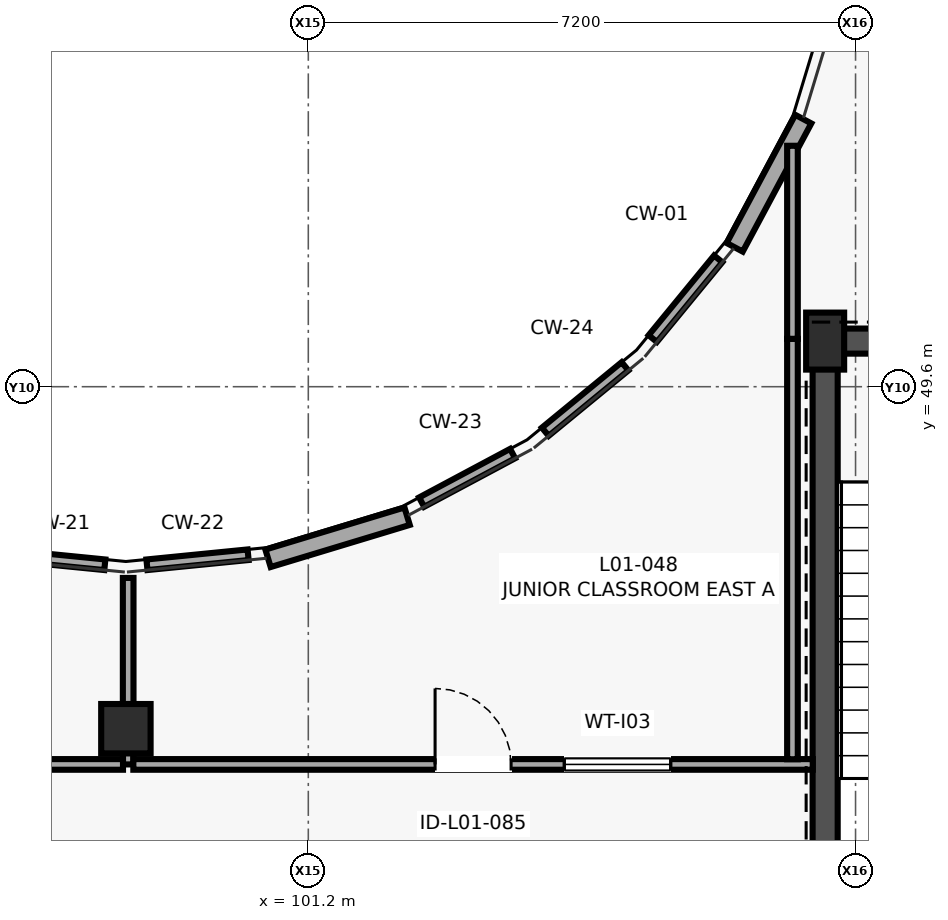
"""IFC4 building model, lengths in metres.
Left out: names, types, materials, properties, quantities, classifications, styles, units other than length and angle.
Written with IfcOpenShell. Run it as: python <this file> out.ifc"""

import sys

from ifc_helpers import new_model, si_unit, direction, frame, frame_2d, origin, origin_2d, place, context, subcontext, project, spatial, rectangle, circle, extrude, element, fill, save


model = new_model("IFC4")
c1 = context("Model", 3, precision=1e-05, world=origin(), true_north=direction((0.0, 1.0)))
c2 = subcontext(c1, "Body", "Model", "MODEL_VIEW")
j1 = project(units=[si_unit("LENGTHUNIT", "METRE"), si_unit("PLANEANGLEUNIT", "RADIAN")], contexts=[c1])
p1 = place(None, origin())
s1 = spatial("IfcSite", under=j1, at=p1, CompositionType="ELEMENT")
p2 = place(p1, origin())
s2 = spatial("IfcBuilding", under=s1, at=p2, CompositionType="ELEMENT")
p3 = place(p2, frame((0.0, 0.0, 4.2)))
s3 = spatial("IfcBuildingStorey", under=s2, at=p3, CompositionType="ELEMENT", Elevation=4.2)
p4 = place(p3, frame((98.8, 45.1, 0.0), z_axis=(0.0, 0.0, 1.0), x_axis=(1.0, 0.0, 0.0)))
e1 = element("IfcColumn", 1, at=p4, inside=s3, PredefinedType="COLUMN", context=c2, shape_type="SweptSolid", body=[
    extrude(circle(Radius=0.325, at=origin_2d()), origin(), (0.0, 0.0, 1.0), 4.0),
])
p5 = place(p3, frame((108.0, 50.2, 0.0), z_axis=(0.0, 0.0, 1.0), x_axis=(1.0, 0.0, 0.0)))
e2 = element("IfcColumn", 2, at=p5, inside=s3, PredefinedType="COLUMN", context=c2, shape_type="SweptSolid", body=[
    extrude(rectangle(XDim=0.5, YDim=0.75, at=origin_2d()), origin(), (0.0, 0.0, 1.0), 4.0),
])
p6 = place(p3, frame((100.67, 47.342, 0.0), z_axis=(0.0, 0.0, 1.0), x_axis=(0.957113490504, 0.289713248393, 0.0)))
e3 = element("IfcWall", 3, at=p6, inside=s3, PredefinedType="SOLIDWALL", context=c2, shape_type="SweptSolid", body=[
    extrude(rectangle(XDim=1.912, YDim=0.24, at=frame_2d((0.956, 0.0))), origin(), (0.0, 0.0, 1.0), 3.78),
])
p7 = place(p3, frame((106.81, 51.434, 0.0), z_axis=(0.0, 0.0, 1.0), x_axis=(0.471449153109, 0.881893245259, 0.0)))
e4 = element("IfcWall", 4, at=p7, inside=s3, PredefinedType="SOLIDWALL", context=c2, shape_type="SweptSolid", body=[
    extrude(rectangle(XDim=1.913, YDim=0.24, at=frame_2d((0.957, 0.0))), origin(), (0.0, 0.0, 1.0), 3.78),
])
p8 = place(p3, frame((107.835, 50.2, 0.0), z_axis=(0.0, 0.0, 1.0), x_axis=(1.0, 0.0, 0.0)))
e5 = element("IfcWall", 5, at=p8, inside=s3, PredefinedType="SHEAR", context=c2, shape_type="SweptSolid", body=[
    extrude(rectangle(XDim=7.53, YDim=0.33, at=frame_2d((3.765, 0.0))), origin(), (0.0, 0.0, 1.0), 3.78),
])
p9 = place(p8, frame((5.015, 0.0, 0.0)))
e6 = element("IfcOpeningElement", 6, at=p9, cuts=e5, PredefinedType="OPENING", context=c2, shape_type="SweptSolid", body=[
    extrude(rectangle(XDim=1.05, YDim=2.15, at=frame_2d((0.525, 1.075))), frame((0.0, 0.175, 0.0), z_axis=(0.0, -1.0, 0.0), x_axis=(1.0, 0.0, 0.0)), (0.0, 0.0, 1.0), 0.35),
])
p10 = place(p8, frame((1.565, 0.0, 0.0)))
e7 = element("IfcOpeningElement", 7, at=p10, cuts=e5, PredefinedType="OPENING", context=c2, shape_type="SweptSolid", body=[
    extrude(rectangle(XDim=1.1, YDim=2.15, at=frame_2d((0.55, 1.075))), frame((0.0, 0.175, 0.0), z_axis=(0.0, -1.0, 0.0), x_axis=(1.0, 0.0, 0.0)), (0.0, 0.0, 1.0), 0.35),
])
p11 = place(p3, frame((108.0, 42.565, 0.0), z_axis=(0.0, 0.0, 1.0), x_axis=(0.0, 1.0, 0.0)))
e8 = element("IfcWall", 8, at=p11, inside=s3, PredefinedType="SHEAR", context=c2, shape_type="SweptSolid", body=[
    extrude(rectangle(XDim=7.47, YDim=0.33, at=frame_2d((3.735, 0.0))), origin(), (0.0, 0.0, 1.0), 3.78),
])
for number, where, z_axis, x_axis in (
    (9, (105.367, 49.868, 0.0), (0.0, 0.0, 1.0), (-0.773, -0.634, 0.0)),
    (10, (103.888, 48.72, 0.0), (0.0, 0.0, 1.0), (-0.882, -0.471, 0.0)),
):
    element("IfcWall", number, at=place(p3, frame(where, z_axis=z_axis, x_axis=x_axis)), inside=s3, PredefinedType="PARTITIONING", context=c2, shape_type="SweptSolid", body=[
        extrude(rectangle(XDim=1.357, YDim=0.14, at=frame_2d((0.678, 0.0))), origin(), (0.0, 0.0, 1.0), 3.775),
    ])
p12 = place(p3, frame((100.408, 47.389, 0.0), z_axis=(0.0, 0.0, 1.0), x_axis=(-0.99513072014, -0.098563937798, 0.0)))
e11 = element("IfcWall", 11, at=p12, inside=s3, PredefinedType="PARTITIONING", context=c2, shape_type="SweptSolid", body=[
    extrude(rectangle(XDim=1.338, YDim=0.14, at=frame_2d((0.669, 0.0))), origin(), (0.0, 0.0, 1.0), 3.775),
])
p13 = place(p3, frame((98.83, 47.084, 0.0), z_axis=(0.0, 0.0, 1.0), x_axis=(0.0, -1.0, 0.0)))
e12 = element("IfcWall", 12, at=p13, inside=s3, PredefinedType="PARTITIONING", context=c2, shape_type="SweptSolid", body=[
    extrude(rectangle(XDim=2.454, YDim=0.14, at=frame_2d((1.227, 0.0))), origin(), (0.0, 0.0, 1.0), 3.775),
])
p14 = place(p3, frame((98.898, 44.63, 0.0), z_axis=(0.0, 0.0, 1.0), x_axis=(1.0, 0.0, 0.0)))
e13 = element("IfcWall", 13, at=p14, inside=s3, PredefinedType="PARTITIONING", context=c2, shape_type="SweptSolid", body=[
    extrude(rectangle(XDim=8.939, YDim=0.14, at=frame_2d((4.469, 0.0))), origin(), (0.0, 0.0, 1.0), 3.775),
])
p15 = place(p14, frame((3.97, 0.0, 0.0)))
e14 = element("IfcOpeningElement", 14, at=p15, cuts=e13, PredefinedType="OPENING", context=c2, shape_type="SweptSolid", body=[
    extrude(rectangle(XDim=1.0, YDim=2.1, at=frame_2d((0.5, 1.05))), frame((0.0, 0.08, 0.0), z_axis=(0.0, -1.0, 0.0), x_axis=(1.0, 0.0, 0.0)), (0.0, 0.0, 1.0), 0.16),
])
p16 = place(p14, frame((5.67, 0.0, 1.05)))
e15 = element("IfcOpeningElement", 15, at=p16, cuts=e13, PredefinedType="OPENING", context=c2, shape_type="SweptSolid", body=[
    extrude(rectangle(XDim=1.4, YDim=1.05, at=frame_2d((0.7, 0.525))), frame((0.0, 0.08, 0.0), z_axis=(0.0, -1.0, 0.0), x_axis=(1.0, 0.0, 0.0)), (0.0, 0.0, 1.0), 0.16),
])
p17 = place(p3, frame((107.57, 44.698, 0.0), z_axis=(0.0, 0.0, 1.0), x_axis=(0.0, 1.0, 0.0)))
e16 = element("IfcWall", 16, at=p17, inside=s3, PredefinedType="PARTITIONING", context=c2, shape_type="SweptSolid", body=[
    extrude(rectangle(XDim=5.532, YDim=0.14, at=frame_2d((2.766, 0.0))), origin(), (0.0, 0.0, 1.0), 3.775),
])
p18 = place(p3, frame((107.57, 50.23, 0.0), z_axis=(0.0, 0.0, 1.0), x_axis=(0.0, 1.0, 0.0)))
e17 = element("IfcWall", 17, at=p18, inside=s3, PredefinedType="PARTITIONING", context=c2, shape_type="SweptSolid", body=[
    extrude(rectangle(XDim=2.54, YDim=0.14, at=frame_2d((1.27, 0.0))), origin(), (0.0, 0.0, 1.0), 3.775),
])
p19 = place(p3, frame((106.593, 51.282, 0.0), z_axis=(0.0, 0.0, 1.0), x_axis=(-0.634451674201, -0.772962530207, 0.0)))
e18 = element("IfcWall", 18, at=p19, inside=s3, PredefinedType="PARTITIONING", context=c2, shape_type="SweptSolid", body=[
    extrude(rectangle(XDim=1.357, YDim=0.14, at=frame_2d((0.679, 0.0))), origin(), (0.0, 0.0, 1.0), 3.775),
])
p20 = place(p3, frame((88.038, 44.63, 0.0), z_axis=(0.0, 0.0, 1.0), x_axis=(1.0, 0.0, 0.0)))
e19 = element("IfcWall", 19, at=p20, inside=s3, PredefinedType="PARTITIONING", context=c2, shape_type="SweptSolid", body=[
    extrude(rectangle(XDim=10.724, YDim=0.14, at=frame_2d((5.362, 0.0))), origin(), (0.0, 0.0, 1.0), 3.775),
])
p21 = place(p20, frame((4.862, 0.0, 0.0)))
e20 = element("IfcOpeningElement", 20, at=p21, cuts=e19, PredefinedType="OPENING", context=c2, shape_type="SweptSolid", body=[
    extrude(rectangle(XDim=1.0, YDim=2.1, at=frame_2d((0.5, 1.05))), frame((0.0, 0.08, 0.0), z_axis=(0.0, -1.0, 0.0), x_axis=(1.0, 0.0, 0.0)), (0.0, 0.0, 1.0), 0.16),
])
p22 = place(p20, frame((6.562, 0.0, 1.05)))
e21 = element("IfcOpeningElement", 21, at=p22, cuts=e19, PredefinedType="OPENING", context=c2, shape_type="SweptSolid", body=[
    extrude(rectangle(XDim=1.8, YDim=1.2, at=frame_2d((0.9, 0.6))), frame((0.0, 0.08, 0.0), z_axis=(0.0, -1.0, 0.0), x_axis=(1.0, 0.0, 0.0)), (0.0, 0.0, 1.0), 0.16),
])
p23 = place(p3, frame((98.523, 47.257, 0.0), z_axis=(0.0, 0.0, 1.0), x_axis=(-0.99513072014, 0.098563937798, 0.0)))
e22 = element("IfcWall", 22, at=p23, inside=s3, PredefinedType="PARTITIONING", context=c2, shape_type="SweptSolid", body=[
    extrude(rectangle(XDim=1.338, YDim=0.14, at=frame_2d((0.669, 0.0))), origin(), (0.0, 0.0, 1.0), 3.775),
])
p24 = place(p15, origin())
e23 = element("IfcDoor", 23, at=p24, inside=s3, OperationType="SINGLE_SWING_LEFT", PredefinedType="DOOR", context=c2, shape_type="SweptSolid", body=[
    extrude(rectangle(XDim=1.0, YDim=2.1, at=frame_2d((0.5, 1.05))), frame((0.0, 0.025, 0.0), z_axis=(0.0, -1.0, 0.0), x_axis=(1.0, 0.0, 0.0)), (0.0, 0.0, 1.0), 0.05),
])
fill(e14, e23)
p25 = place(p16, origin())
e24 = element("IfcWindow", 24, at=p25, inside=s3, PartitioningType="SINGLE_PANEL", PredefinedType="WINDOW", context=c2, shape_type="SweptSolid", body=[
    extrude(rectangle(XDim=1.4, YDim=1.05, at=frame_2d((0.7, 0.525))), frame((0.0, 0.03, 0.0), z_axis=(0.0, -1.0, 0.0), x_axis=(1.0, 0.0, 0.0)), (0.0, 0.0, 1.0), 0.06),
])
fill(e15, e24)
save(model, sys.argv[1])
